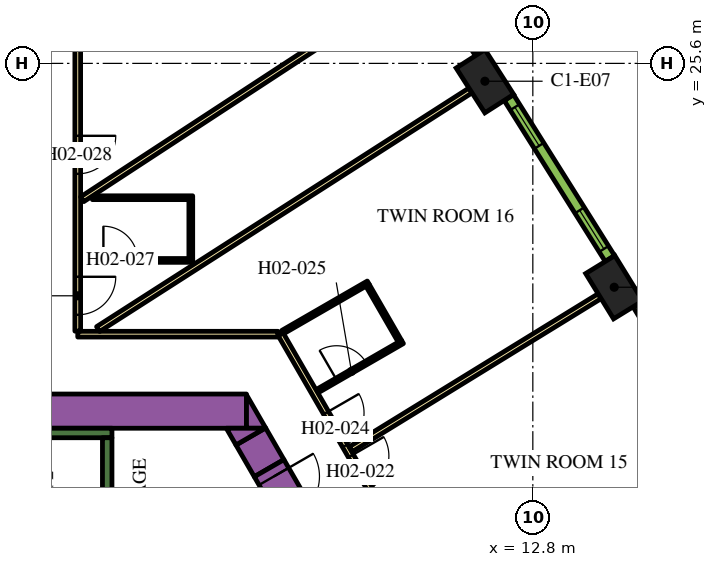
"""IFC4 building model, lengths in metres.
Left out: names, types, materials, properties, quantities, classifications, styles, units other than length and angle.
Written with IfcOpenShell. Run it as: python <this file> out.ifc"""

import sys

from ifc_helpers import new_model, si_unit, direction, frame, frame_2d, origin, origin_2d, place, context, subcontext, project, spatial, polyline, rectangle, outline, extrude, element, fill, save


model = new_model("IFC4")
c1 = context("Model", 3, precision=1e-05, world=origin(), true_north=direction((0.0, 1.0)))
c2 = subcontext(c1, "Body", "Model", "MODEL_VIEW")
j1 = project(units=[si_unit("LENGTHUNIT", "METRE"), si_unit("PLANEANGLEUNIT", "RADIAN")], contexts=[c1])
p1 = place(None, origin())
s1 = spatial("IfcSite", under=j1, at=p1, CompositionType="ELEMENT")
p2 = place(p1, origin())
s2 = spatial("IfcBuilding", under=s1, at=p2, CompositionType="ELEMENT")
p3 = place(p2, frame((0.0, 0.0, 39.3)))
s3 = spatial("IfcBuildingStorey", under=s2, at=p3, CompositionType="ELEMENT", Elevation=39.3)
for number, where, z_axis, x_axis in (
    (1, (14.942, 19.71, 0.0), (0.0, 0.0, 1.0), (-0.524, 0.852, 0.0)),
    (2, (11.539, 25.131, 0.0), (0.0, 0.0, 1.0), (-0.539, 0.842, 0.0)),
):
    element("IfcColumn", number, at=place(p3, frame(where, z_axis=z_axis, x_axis=x_axis)), inside=s3, PredefinedType="COLUMN", context=c2, shape_type="SweptSolid", body=[
        extrude(rectangle(XDim=1.4, YDim=0.9, at=origin_2d()), origin(), (0.0, 0.0, 1.0), 3.9),
    ])
p4 = place(p3, frame((-4.224, 16.45, 0.0), z_axis=(0.0, 0.0, 1.0), x_axis=(1.0, 0.0, 0.0)))
e3 = element("IfcWall", 3, at=p4, inside=s3, PredefinedType="SOLIDWALL", context=c2, shape_type="SweptSolid", body=[
    extrude(rectangle(XDim=9.488, YDim=0.9, at=frame_2d((4.744, 0.0))), origin(), (0.0, 0.0, 1.0), 3.9),
])
p5 = place(p3, origin())
e4 = element("IfcWall", 4, at=p5, inside=s3, PredefinedType="SOLIDWALL", context=c2, shape_type="SweptSolid", body=[
    extrude(outline(polyline([(5.265, 16.0), (5.265, 16.88), (5.773, 16.0), (5.265, 16.0)])), origin(), (0.0, 0.0, 1.0), 3.9),
])
p6 = place(p3, frame((5.861, 14.949, 0.0), z_axis=(0.0, 0.0, 1.0), x_axis=(-0.50011719232, 0.865957732194, 0.0)))
e5 = element("IfcWall", 5, at=p6, inside=s3, PredefinedType="SOLIDWALL", context=c2, shape_type="SweptSolid", body=[
    extrude(rectangle(XDim=0.964, YDim=0.9, at=frame_2d((0.482, 0.0))), origin(), (0.0, 0.0, 1.0), 3.9),
])
e6 = element("IfcWall", 6, at=p5, inside=s3, PredefinedType="SOLIDWALL", context=c2, shape_type="SweptSolid", body=[
    extrude(outline(polyline([(4.734, 16.0), (5.75, 16.0), (4.988, 15.56), (4.734, 16.0)])), origin(), (0.0, 0.0, 1.0), 3.9),
])
p7 = place(p3, frame((-1.725, 15.875, 0.0), z_axis=(0.0, 0.0, 1.0), x_axis=(1.0, 0.0, 0.0)))
e7 = element("IfcWall", 7, at=p7, inside=s3, PredefinedType="SOLIDWALL", context=c2, shape_type="SweptSolid", body=[
    extrude(rectangle(XDim=3.45, YDim=0.25, at=frame_2d((1.725, 0.0))), origin(), (0.0, 0.0, 1.0), 3.9),
])
p8 = place(p3, frame((1.6, 8.95, 0.0), z_axis=(0.0, 0.0, 1.0), x_axis=(0.0, 1.0, 0.0)))
e8 = element("IfcWall", 8, at=p8, inside=s3, PredefinedType="SOLIDWALL", context=c2, shape_type="SweptSolid", body=[
    extrude(rectangle(XDim=6.8, YDim=0.25, at=frame_2d((3.4, 0.0))), origin(), (0.0, 0.0, 1.0), 3.9),
])
p9 = place(p3, frame((5.861, 14.948, 0.0), z_axis=(0.0, 0.0, 1.0), x_axis=(0.500062241894, -0.865989465428, 0.0)))
e9 = element("IfcWall", 9, at=p9, inside=s3, PredefinedType="SOLIDWALL", context=c2, shape_type="SweptSolid", body=[
    extrude(rectangle(XDim=1.7, YDim=0.9, at=frame_2d((0.85, 0.0))), origin(), (0.0, 0.0, 1.0), 3.9),
])
p10 = place(p9, frame((0.25, 0.0, 0.0)))
e10 = element("IfcOpeningElement", 10, at=p10, cuts=e9, PredefinedType="OPENING", context=c2, shape_type="SweptSolid", body=[
    extrude(rectangle(XDim=1.2, YDim=2.1, at=frame_2d((0.6, 1.05))), frame((0.0, 0.46, 0.0), z_axis=(0.0, -1.0, 0.0), x_axis=(1.0, 0.0, 0.0)), (0.0, 0.0, 1.0), 0.92),
])
p11 = place(p3, frame((6.163, 18.475, 0.0), z_axis=(0.0, 0.0, 1.0), x_axis=(0.500001317485, -0.866024643133, 0.0)))
e11 = element("IfcWall", 11, at=p11, inside=s3, PredefinedType="PARTITIONING", context=c2, shape_type="SweptSolid", body=[
    extrude(rectangle(XDim=25.767, YDim=0.15, at=frame_2d((12.883, 0.0))), origin(), (0.0, 0.0, 1.0), 2.75),
])
p12 = place(p11, frame((24.586, 0.0, 0.0)))
e12 = element("IfcOpeningElement", 12, at=p12, cuts=e11, PredefinedType="OPENING", context=c2, shape_type="SweptSolid", body=[
    extrude(rectangle(XDim=1.0, YDim=2.1, at=frame_2d((0.5, 1.05))), frame((0.0, 0.085, 0.0), z_axis=(0.0, -1.0, 0.0), x_axis=(1.0, 0.0, 0.0)), (0.0, 0.0, 1.0), 0.17),
])
p13 = place(p11, frame((16.196, 0.0, 0.0)))
e13 = element("IfcOpeningElement", 13, at=p13, cuts=e11, PredefinedType="OPENING", context=c2, shape_type="SweptSolid", body=[
    extrude(rectangle(XDim=1.0, YDim=2.1, at=frame_2d((0.5, 1.05))), frame((0.0, 0.085, 0.0), z_axis=(0.0, -1.0, 0.0), x_axis=(1.0, 0.0, 0.0)), (0.0, 0.0, 1.0), 0.17),
])
p14 = place(p11, frame((14.789, 0.0, 0.0)))
e14 = element("IfcOpeningElement", 14, at=p14, cuts=e11, PredefinedType="OPENING", context=c2, shape_type="SweptSolid", body=[
    extrude(rectangle(XDim=1.1, YDim=2.1, at=frame_2d((0.55, 1.05))), frame((0.0, 0.085, 0.0), z_axis=(0.0, -1.0, 0.0), x_axis=(1.0, 0.0, 0.0)), (0.0, 0.0, 1.0), 0.17),
])
p15 = place(p11, frame((3.698, 0.0, 0.0)))
e15 = element("IfcOpeningElement", 15, at=p15, cuts=e11, PredefinedType="OPENING", context=c2, shape_type="SweptSolid", body=[
    extrude(rectangle(XDim=1.0, YDim=2.1, at=frame_2d((0.5, 1.05))), frame((0.0, 0.085, 0.0), z_axis=(0.0, -1.0, 0.0), x_axis=(1.0, 0.0, 0.0)), (0.0, 0.0, 1.0), 0.17),
])
p16 = place(p11, frame((2.391, 0.0, 0.0)))
e16 = element("IfcOpeningElement", 16, at=p16, cuts=e11, PredefinedType="OPENING", context=c2, shape_type="SweptSolid", body=[
    extrude(rectangle(XDim=1.0, YDim=2.1, at=frame_2d((0.5, 1.05))), frame((0.0, 0.085, 0.0), z_axis=(0.0, -1.0, 0.0), x_axis=(1.0, 0.0, 0.0)), (0.0, 0.0, 1.0), 0.17),
])
p17 = place(p3, frame((0.825, 18.475, 0.0), z_axis=(0.0, 0.0, 1.0), x_axis=(1.0, 0.0, 0.0)))
e17 = element("IfcWall", 17, at=p17, inside=s3, PredefinedType="PARTITIONING", context=c2, shape_type="SweptSolid", body=[
    extrude(rectangle(XDim=5.268, YDim=0.15, at=frame_2d((2.634, 0.0))), origin(), (0.0, 0.0, 1.0), 2.75),
])
p18 = place(p3, frame((0.825, 34.699, 0.0), z_axis=(0.0, 0.0, 1.0), x_axis=(0.0, -1.0, 0.0)))
e18 = element("IfcWall", 18, at=p18, inside=s3, PredefinedType="PARTITIONING", context=c2, shape_type="SweptSolid", body=[
    extrude(rectangle(XDim=16.144, YDim=0.15, at=frame_2d((8.072, 0.0))), origin(), (0.0, 0.0, 1.0), 2.75),
])
p19 = place(p18, frame((14.714, 0.0, 0.0)))
e19 = element("IfcOpeningElement", 19, at=p19, cuts=e18, PredefinedType="OPENING", context=c2, shape_type="SweptSolid", body=[
    extrude(rectangle(XDim=1.0, YDim=2.1, at=frame_2d((0.5, 1.05))), frame((0.0, 0.085, 0.0), z_axis=(0.0, -1.0, 0.0), x_axis=(1.0, 0.0, 0.0)), (0.0, 0.0, 1.0), 0.17),
])
p20 = place(p18, frame((11.005, 0.0, 0.0)))
e20 = element("IfcOpeningElement", 20, at=p20, cuts=e18, PredefinedType="OPENING", context=c2, shape_type="SweptSolid", body=[
    extrude(rectangle(XDim=1.0, YDim=2.1, at=frame_2d((0.5, 1.05))), frame((0.0, 0.085, 0.0), z_axis=(0.0, -1.0, 0.0), x_axis=(1.0, 0.0, 0.0)), (0.0, 0.0, 1.0), 0.17),
])
p21 = place(p3, frame((9.922, 27.896, 0.0), z_axis=(0.0, 0.0, 1.0), x_axis=(-0.836970816595, -0.547247523675, 0.0)))
e21 = element("IfcWall", 21, at=p21, inside=s3, PredefinedType="PARTITIONING", context=c2, shape_type="SweptSolid", body=[
    extrude(rectangle(XDim=10.729, YDim=0.15, at=frame_2d((5.364, 0.0))), origin(), (0.0, 0.0, 1.0), 2.75),
])
p22 = place(p3, frame((11.16, 24.888, 0.0), z_axis=(0.0, 0.0, 1.0), x_axis=(-0.84199813156, -0.539480441211, 0.0)))
e22 = element("IfcWall", 22, at=p22, inside=s3, PredefinedType="PARTITIONING", context=c2, shape_type="SweptSolid", body=[
    extrude(rectangle(XDim=11.638, YDim=0.15, at=frame_2d((5.819, 0.0))), origin(), (0.0, 0.0, 1.0), 2.75),
])
p23 = place(p3, frame((14.558, 19.475, 0.0), z_axis=(0.0, 0.0, 1.0), x_axis=(-0.851829455142, -0.523819223925, 0.0)))
e23 = element("IfcWall", 23, at=p23, inside=s3, PredefinedType="PARTITIONING", context=c2, shape_type="SweptSolid", body=[
    extrude(rectangle(XDim=7.688, YDim=0.15, at=frame_2d((3.844, 0.0))), origin(), (0.0, 0.0, 1.0), 2.75),
])
p24 = place(p3, frame((7.118, 16.971, 0.0), z_axis=(0.0, 0.0, 1.0), x_axis=(0.866021400173, 0.500006934395, 0.0)))
e24 = element("IfcWall", 24, at=p24, inside=s3, PredefinedType="PARTITIONING", context=c2, shape_type="SweptSolid", body=[
    extrude(rectangle(XDim=2.6, YDim=0.1, at=frame_2d((1.3, 0.0))), origin(), (0.0, 0.0, 1.0), 2.75),
])
p25 = place(p24, frame((0.6, 0.0, 0.0)))
e25 = element("IfcOpeningElement", 25, at=p25, cuts=e24, PredefinedType="OPENING", context=c2, shape_type="SweptSolid", body=[
    extrude(rectangle(XDim=0.9, YDim=2.1, at=frame_2d((0.45, 1.05))), frame((0.0, 0.06, 0.0), z_axis=(0.0, -1.0, 0.0), x_axis=(1.0, 0.0, 0.0)), (0.0, 0.0, 1.0), 0.12),
])
p26 = place(p3, frame((9.302, 18.289, 0.0), z_axis=(0.0, 0.0, 1.0), x_axis=(-0.500062241894, 0.865989465428, 0.0)))
e26 = element("IfcWall", 26, at=p26, inside=s3, PredefinedType="PARTITIONING", context=c2, shape_type="SweptSolid", body=[
    extrude(rectangle(XDim=1.7, YDim=0.1, at=frame_2d((0.85, 0.0))), origin(), (0.0, 0.0, 1.0), 2.75),
])
p27 = place(p3, frame((6.218, 18.53, 0.0), z_axis=(0.0, 0.0, 1.0), x_axis=(0.865997922154, 0.500047596559, 0.0)))
e27 = element("IfcWall", 27, at=p27, inside=s3, PredefinedType="PARTITIONING", context=c2, shape_type="SweptSolid", body=[
    extrude(rectangle(XDim=2.6, YDim=0.1, at=frame_2d((1.3, 0.0))), origin(), (0.0, 0.0, 1.0), 2.75),
])
p28 = place(p3, frame((0.9, 20.416, 0.0), z_axis=(0.0, 0.0, 1.0), x_axis=(1.0, 0.0, 0.0)))
e28 = element("IfcWall", 28, at=p28, inside=s3, PredefinedType="PARTITIONING", context=c2, shape_type="SweptSolid", body=[
    extrude(rectangle(XDim=2.95, YDim=0.1, at=frame_2d((1.475, 0.0))), origin(), (0.0, 0.0, 1.0), 2.75),
])
p29 = place(p28, frame((0.6, 0.0, 0.0)))
e29 = element("IfcOpeningElement", 29, at=p29, cuts=e28, PredefinedType="OPENING", context=c2, shape_type="SweptSolid", body=[
    extrude(rectangle(XDim=0.9, YDim=2.1, at=frame_2d((0.45, 1.05))), frame((0.0, 0.06, 0.0), z_axis=(0.0, -1.0, 0.0), x_axis=(1.0, 0.0, 0.0)), (0.0, 0.0, 1.0), 0.12),
])
p30 = place(p3, frame((3.8, 20.466, 0.0), z_axis=(0.0, 0.0, 1.0), x_axis=(0.0, 1.0, 0.0)))
e30 = element("IfcWall", 30, at=p30, inside=s3, PredefinedType="PARTITIONING", context=c2, shape_type="SweptSolid", body=[
    extrude(rectangle(XDim=1.55, YDim=0.1, at=frame_2d((0.775, 0.0))), origin(), (0.0, 0.0, 1.0), 2.75),
])
p31 = place(p3, frame((1.21, 22.066, 0.0), z_axis=(0.0, 0.0, 1.0), x_axis=(1.0, 0.0, 0.0)))
e31 = element("IfcWall", 31, at=p31, inside=s3, PredefinedType="PARTITIONING", context=c2, shape_type="SweptSolid", body=[
    extrude(rectangle(XDim=2.64, YDim=0.1, at=frame_2d((1.32, 0.0))), origin(), (0.0, 0.0, 1.0), 2.75),
])
p32 = place(p3, frame((18.143, 14.986, 0.0), z_axis=(0.0, 0.0, 1.0), x_axis=(-0.515938796285, 0.856625448191, 0.0)))
e32 = element("IfcWall", 32, at=p32, inside=s3, PredefinedType="SOLIDWALL", context=c2, shape_type="SweptSolid", body=[
    extrude(rectangle(XDim=4.998, YDim=0.29, at=frame_2d((2.499, 0.0))), origin(), (0.0, 0.0, 1.0), 3.65),
])
p33 = place(p32, frame((0.297, 0.0, 0.9)))
e33 = element("IfcOpeningElement", 33, at=p33, cuts=e32, PredefinedType="OPENING", context=c2, shape_type="SweptSolid", body=[
    extrude(rectangle(XDim=1.2, YDim=2.15, at=frame_2d((0.6, 1.075))), frame((0.0, 0.155, 0.0), z_axis=(0.0, -1.0, 0.0), x_axis=(1.0, 0.0, 0.0)), (0.0, 0.0, 1.0), 0.31),
])
p34 = place(p32, frame((3.501, 0.0, 0.9)))
e34 = element("IfcOpeningElement", 34, at=p34, cuts=e32, PredefinedType="OPENING", context=c2, shape_type="SweptSolid", body=[
    extrude(rectangle(XDim=1.2, YDim=2.15, at=frame_2d((0.6, 1.075))), frame((0.0, 0.155, 0.0), z_axis=(0.0, -1.0, 0.0), x_axis=(1.0, 0.0, 0.0)), (0.0, 0.0, 1.0), 0.31),
])
p35 = place(p3, frame((14.827, 20.466, 0.0), z_axis=(0.0, 0.0, 1.0), x_axis=(-0.531688286542, 0.846940119462, 0.0)))
e35 = element("IfcWall", 35, at=p35, inside=s3, PredefinedType="SOLIDWALL", context=c2, shape_type="SweptSolid", body=[
    extrude(rectangle(XDim=4.998, YDim=0.29, at=frame_2d((2.499, 0.0))), origin(), (0.0, 0.0, 1.0), 3.65),
])
p36 = place(p35, frame((0.297, 0.0, 0.9)))
e36 = element("IfcOpeningElement", 36, at=p36, cuts=e35, PredefinedType="OPENING", context=c2, shape_type="SweptSolid", body=[
    extrude(rectangle(XDim=1.2, YDim=2.15, at=frame_2d((0.6, 1.075))), frame((0.0, 0.155, 0.0), z_axis=(0.0, -1.0, 0.0), x_axis=(1.0, 0.0, 0.0)), (0.0, 0.0, 1.0), 0.31),
])
p37 = place(p35, frame((3.501, 0.0, 0.9)))
e37 = element("IfcOpeningElement", 37, at=p37, cuts=e35, PredefinedType="OPENING", context=c2, shape_type="SweptSolid", body=[
    extrude(rectangle(XDim=1.2, YDim=2.15, at=frame_2d((0.6, 1.075))), frame((0.0, 0.155, 0.0), z_axis=(0.0, -1.0, 0.0), x_axis=(1.0, 0.0, 0.0)), (0.0, 0.0, 1.0), 0.31),
])
p38 = place(p3, frame((11.411, 25.884, 0.0), z_axis=(0.0, 0.0, 1.0), x_axis=(-0.547204617628, 0.836998868845, 0.0)))
e38 = element("IfcWall", 38, at=p38, inside=s3, PredefinedType="SOLIDWALL", context=c2, shape_type="SweptSolid", body=[
    extrude(rectangle(XDim=4.998, YDim=0.29, at=frame_2d((2.499, 0.0))), origin(), (0.0, 0.0, 1.0), 3.65),
])
p39 = place(p38, frame((0.297, 0.0, 0.9)))
e39 = element("IfcOpeningElement", 39, at=p39, cuts=e38, PredefinedType="OPENING", context=c2, shape_type="SweptSolid", body=[
    extrude(rectangle(XDim=1.2, YDim=2.15, at=frame_2d((0.6, 1.075))), frame((0.0, 0.155, 0.0), z_axis=(0.0, -1.0, 0.0), x_axis=(1.0, 0.0, 0.0)), (0.0, 0.0, 1.0), 0.31),
])
p40 = place(p38, frame((3.501, 0.0, 0.9)))
e40 = element("IfcOpeningElement", 40, at=p40, cuts=e38, PredefinedType="OPENING", context=c2, shape_type="SweptSolid", body=[
    extrude(rectangle(XDim=1.2, YDim=2.15, at=frame_2d((0.6, 1.075))), frame((0.0, 0.155, 0.0), z_axis=(0.0, -1.0, 0.0), x_axis=(1.0, 0.0, 0.0)), (0.0, 0.0, 1.0), 0.31),
])
p41 = place(p10, origin())
e41 = element("IfcDoor", 41, at=p41, inside=s3, OperationType="SINGLE_SWING_LEFT", PredefinedType="DOOR", context=c2, shape_type="SweptSolid", body=[
    extrude(rectangle(XDim=1.2, YDim=2.1, at=frame_2d((0.6, 1.05))), frame((0.0, 0.025, 0.0), z_axis=(0.0, -1.0, 0.0), x_axis=(1.0, 0.0, 0.0)), (0.0, 0.0, 1.0), 0.05),
])
fill(e10, e41)
p42 = place(p15, origin())
e42 = element("IfcDoor", 42, at=p42, inside=s3, OperationType="SINGLE_SWING_LEFT", PredefinedType="DOOR", context=c2, shape_type="SweptSolid", body=[
    extrude(rectangle(XDim=1.0, YDim=2.1, at=frame_2d((0.5, 1.05))), frame((0.0, 0.025, 0.0), z_axis=(0.0, -1.0, 0.0), x_axis=(1.0, 0.0, 0.0)), (0.0, 0.0, 1.0), 0.05),
])
fill(e15, e42)
p43 = place(p16, origin())
e43 = element("IfcDoor", 43, at=p43, inside=s3, OperationType="SINGLE_SWING_RIGHT", PredefinedType="DOOR", context=c2, shape_type="SweptSolid", body=[
    extrude(rectangle(XDim=1.0, YDim=2.1, at=frame_2d((0.5, 1.05))), frame((0.0, 0.025, 0.0), z_axis=(0.0, -1.0, 0.0), x_axis=(1.0, 0.0, 0.0)), (0.0, 0.0, 1.0), 0.05),
])
fill(e16, e43)
p44 = place(p25, origin())
e44 = element("IfcDoor", 44, at=p44, inside=s3, OperationType="SINGLE_SWING_LEFT", PredefinedType="DOOR", context=c2, shape_type="SweptSolid", body=[
    extrude(rectangle(XDim=0.9, YDim=2.1, at=frame_2d((0.45, 1.05))), frame((0.0, 0.025, 0.0), z_axis=(0.0, -1.0, 0.0), x_axis=(1.0, 0.0, 0.0)), (0.0, 0.0, 1.0), 0.05),
])
fill(e25, e44)
p45 = place(p19, origin())
e45 = element("IfcDoor", 45, at=p45, inside=s3, OperationType="SINGLE_SWING_RIGHT", PredefinedType="DOOR", context=c2, shape_type="SweptSolid", body=[
    extrude(rectangle(XDim=1.0, YDim=2.1, at=frame_2d((0.5, 1.05))), frame((0.0, 0.025, 0.0), z_axis=(0.0, -1.0, 0.0), x_axis=(1.0, 0.0, 0.0)), (0.0, 0.0, 1.0), 0.05),
])
fill(e19, e45)
p46 = place(p29, origin())
e46 = element("IfcDoor", 46, at=p46, inside=s3, OperationType="SINGLE_SWING_LEFT", PredefinedType="DOOR", context=c2, shape_type="SweptSolid", body=[
    extrude(rectangle(XDim=0.9, YDim=2.1, at=frame_2d((0.45, 1.05))), frame((0.0, 0.025, 0.0), z_axis=(0.0, -1.0, 0.0), x_axis=(1.0, 0.0, 0.0)), (0.0, 0.0, 1.0), 0.05),
])
fill(e29, e46)
p47 = place(p20, origin())
e47 = element("IfcDoor", 47, at=p47, inside=s3, OperationType="SINGLE_SWING_RIGHT", PredefinedType="DOOR", context=c2, shape_type="SweptSolid", body=[
    extrude(rectangle(XDim=1.0, YDim=2.1, at=frame_2d((0.5, 1.05))), frame((0.0, 0.025, 0.0), z_axis=(0.0, -1.0, 0.0), x_axis=(1.0, 0.0, 0.0)), (0.0, 0.0, 1.0), 0.05),
])
fill(e20, e47)
p48 = place(p36, origin())
e48 = element("IfcWindow", 48, at=p48, inside=s3, PartitioningType="DOUBLE_PANEL_VERTICAL", PredefinedType="WINDOW", context=c2, shape_type="SweptSolid", body=[
    extrude(rectangle(XDim=1.2, YDim=2.15, at=frame_2d((0.6, 1.075))), frame((0.0, 0.015, 0.0), z_axis=(0.0, -1.0, 0.0), x_axis=(1.0, 0.0, 0.0)), (0.0, 0.0, 1.0), 0.06),
])
fill(e36, e48)
p49 = place(p37, origin())
e49 = element("IfcWindow", 49, at=p49, inside=s3, PartitioningType="DOUBLE_PANEL_VERTICAL", PredefinedType="WINDOW", context=c2, shape_type="SweptSolid", body=[
    extrude(rectangle(XDim=1.2, YDim=2.15, at=frame_2d((0.6, 1.075))), frame((0.0, 0.015, 0.0), z_axis=(0.0, -1.0, 0.0), x_axis=(1.0, 0.0, 0.0)), (0.0, 0.0, 1.0), 0.06),
])
fill(e37, e49)
save(model, sys.argv[1])
